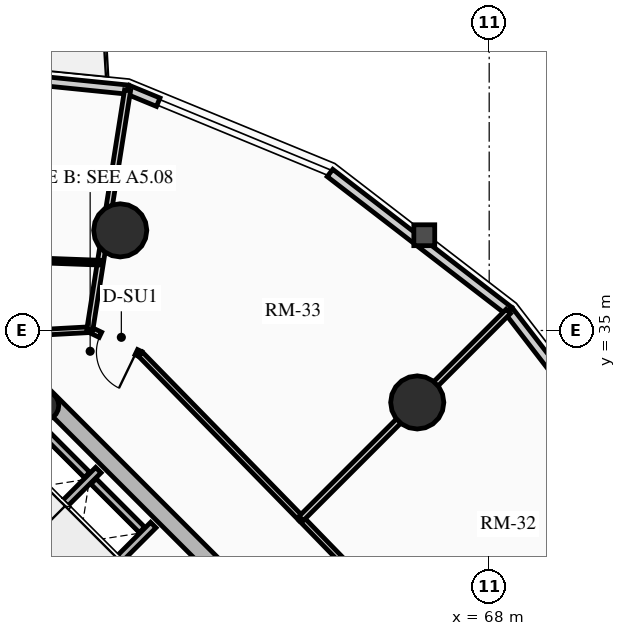
"""IFC4 building model, lengths in metres.
Left out: names, types, materials, properties, quantities, classifications, styles, units other than length and angle.
Written with IfcOpenShell. Run it as: python <this file> out.ifc"""

import sys

from ifc_helpers import new_model, si_unit, direction, frame, frame_2d, origin, origin_2d, place, context, subcontext, project, spatial, rectangle, circle, hollow_circle, extrude, source, transform, mapped, element, fill, save


model = new_model("IFC4")
c1 = context("Model", 3, precision=1e-05, world=origin(), true_north=direction((0.0, 1.0)))
c2 = subcontext(c1, "Body", "Model", "MODEL_VIEW")
j1 = project(units=[si_unit("LENGTHUNIT", "METRE"), si_unit("PLANEANGLEUNIT", "RADIAN")], contexts=[c1])
p1 = place(None, origin())
s1 = spatial("IfcSite", under=j1, at=p1, CompositionType="ELEMENT")
p2 = place(p1, origin())
s2 = spatial("IfcBuilding", under=s1, at=p2, CompositionType="ELEMENT")
p3 = place(p2, frame((0.0, 0.0, 87.61)))
s3 = spatial("IfcBuildingStorey", under=s2, at=p3, CompositionType="ELEMENT", Elevation=87.61)
p4 = place(p3, frame((66.303, 23.263, 0.0), z_axis=(0.0, 0.0, 1.0), x_axis=(-0.707106781187, 0.707106781187, 0.0)))
e1 = element("IfcWall", 1, at=p4, inside=s3, PredefinedType="SHEAR", context=c2, shape_type="SweptSolid", body=[
    extrude(rectangle(XDim=14.2, YDim=0.45, at=frame_2d((7.1, 0.0))), origin(), (0.0, 0.0, 1.0), 2.91),
])
p5 = place(p3, frame((48.856, 25.578, 0.0), z_axis=(0.0, 0.0, 1.0), x_axis=(0.707106781187, 0.707106781187, 0.0)))
e2 = element("IfcWall", 2, at=p5, inside=s3, PredefinedType="SHEAR", context=c2, shape_type="SweptSolid", body=[
    extrude(rectangle(XDim=10.7, YDim=0.45, at=frame_2d((5.35, 0.0))), origin(), (0.0, 0.0, 1.0), 2.91),
])
m1 = source(origin(), c2, "Body", "SweptSolid", [
    extrude(rectangle(XDim=1.5, YDim=2.02, at=frame_2d((0.75, 1.01))), frame((0.0, 0.235, 0.0), z_axis=(0.0, -1.0, 0.0), x_axis=(1.0, 0.0, 0.0)), (0.0, 0.0, 1.0), 0.47),
])
p6 = place(p5, frame((4.6, 0.0, 0.0)))
e3 = element("IfcOpeningElement", 3, at=p6, cuts=e2, PredefinedType="OPENING", context=c2, shape_type="MappedRepresentation", body=[
    mapped(m1, transform((0.0, 0.0, 0.0), x_axis=(1.0, 0.0, 0.0), y_axis=(0.0, 1.0, 0.0), z_axis=(0.0, 0.0, 1.0), scale=1.0)),
])
p7 = place(p3, frame((63.645, 20.922, 0.0), z_axis=(0.0, 0.0, 1.0), x_axis=(-0.707106781187, 0.707106781187, 0.0)))
e4 = element("IfcWall", 4, at=p7, inside=s3, PredefinedType="SHEAR", context=c2, shape_type="SweptSolid", body=[
    extrude(rectangle(XDim=13.75, YDim=0.35, at=frame_2d((6.875, 0.0))), origin(), (0.0, 0.0, 1.0), 2.91),
])
m2 = source(origin(), c2, "Body", "SweptSolid", [
    extrude(rectangle(XDim=1.1, YDim=2.015, at=frame_2d((0.55, 1.007))), frame((0.0, 0.185, 0.0), z_axis=(0.0, -1.0, 0.0), x_axis=(1.0, 0.0, 0.0)), (0.0, 0.0, 1.0), 0.37),
])
p8 = place(p7, frame((10.0, 0.0, 0.0)))
e5 = element("IfcOpeningElement", 5, at=p8, cuts=e4, PredefinedType="OPENING", context=c2, shape_type="MappedRepresentation", body=[
    mapped(m2, transform((0.0, 0.0, 0.0), x_axis=(1.0, 0.0, 0.0), y_axis=(0.0, 1.0, 0.0), z_axis=(0.0, 0.0, 1.0), scale=1.0)),
])
p9 = place(p7, frame((12.0, 0.0, 0.0)))
e6 = element("IfcOpeningElement", 6, at=p9, cuts=e4, PredefinedType="OPENING", context=c2, shape_type="MappedRepresentation", body=[
    mapped(m2, transform((0.0, 0.0, 0.0), x_axis=(1.0, 0.0, 0.0), y_axis=(0.0, 1.0, 0.0), z_axis=(0.0, 0.0, 1.0), scale=1.0)),
])
m3 = source(origin(), c2, "Body", "SweptSolid", [
    extrude(rectangle(XDim=1.15, YDim=2.02, at=frame_2d((0.575, 1.01))), frame((0.0, 0.185, 0.0), z_axis=(0.0, -1.0, 0.0), x_axis=(1.0, 0.0, 0.0)), (0.0, 0.0, 1.0), 0.37),
])
p10 = place(p7, frame((5.305, 0.0, 0.0)))
e7 = element("IfcOpeningElement", 7, at=p10, cuts=e4, PredefinedType="OPENING", context=c2, shape_type="MappedRepresentation", body=[
    mapped(m3, transform((0.0, 0.0, 0.0), x_axis=(1.0, 0.0, 0.0), y_axis=(0.0, 1.0, 0.0), z_axis=(0.0, 0.0, 1.0), scale=1.0)),
])
p11 = place(p3, frame((56.294, 33.024, 0.0), z_axis=(0.0, 0.0, 1.0), x_axis=(0.707106781187, 0.707106781187, 0.0)))
e8 = element("IfcColumn", 8, at=p11, inside=s3, PredefinedType="COLUMN", context=c2, shape_type="SweptSolid", body=[
    extrude(hollow_circle(Radius=0.38, WallThickness=0.032, at=origin_2d()), origin(), (0.0, 0.0, 1.0), 2.91),
])
for number, where, z_axis, x_axis in (
    (9, (66.107, 33.107, 0.0), (0.0, 0.0, 1.0), (1.0, 0.0, 0.0)),
    (10, (58.291, 37.635, 0.0), (0.0, 0.0, 1.0), (1.0, 0.0, 0.0)),
):
    element("IfcColumn", number, at=place(p3, frame(where, z_axis=z_axis, x_axis=x_axis)), inside=s3, PredefinedType="USERDEFINED", context=c2, shape_type="SweptSolid", body=[
        extrude(circle(Radius=0.7, at=origin_2d()), origin(), (0.0, 0.0, 1.0), 2.91),
    ])
p12 = place(p3, frame((63.811, 39.145, 0.0), z_axis=(0.0, 0.0, 1.0), x_axis=(0.791982052206, -0.61054437102, 0.0)))
e11 = element("IfcWall", 11, at=p12, inside=s3, PredefinedType="SOLIDWALL", context=c2, shape_type="SweptSolid", body=[
    extrude(rectangle(XDim=5.942, YDim=0.24, at=frame_2d((2.971, 0.0))), origin(), (0.0, 0.0, 1.0), 2.179),
])
p13 = place(p3, frame((58.487, 41.339, 0.0), z_axis=(0.0, 0.0, 1.0), x_axis=(0.924556017656, -0.381046152345, 0.0)))
e12 = element("IfcWall", 12, at=p13, inside=s3, PredefinedType="SOLIDWALL", context=c2, shape_type="SweptSolid", body=[
    extrude(rectangle(XDim=0.87, YDim=0.24, at=frame_2d((0.435, 0.0))), origin(), (0.0, 0.0, 1.0), 2.179),
])
p14 = place(p3, frame((53.067, 41.885, 0.0), z_axis=(0.0, 0.0, 1.0), x_axis=(0.994971754311, -0.10015591906, 0.0)))
e13 = element("IfcWall", 13, at=p14, inside=s3, PredefinedType="SOLIDWALL", context=c2, shape_type="SweptSolid", body=[
    extrude(rectangle(XDim=5.448, YDim=0.24, at=frame_2d((2.724, 0.0))), origin(), (0.0, 0.0, 1.0), 2.179),
])
m4 = source(origin(), c2, "Body", "SweptSolid", [
    extrude(rectangle(XDim=1.15, YDim=2.005, at=frame_2d((0.575, 1.002))), frame((0.0, 0.13, 0.0), z_axis=(0.0, -1.0, 0.0), x_axis=(1.0, 0.0, 0.0)), (0.0, 0.0, 1.0), 0.26),
])
p15 = place(p14, frame((2.149, 0.0, 0.0)))
e14 = element("IfcOpeningElement", 14, at=p15, cuts=e13, PredefinedType="OPENING", context=c2, shape_type="MappedRepresentation", body=[
    mapped(m4, transform((0.0, 0.0, 0.0), x_axis=(1.0, 0.0, 0.0), y_axis=(0.0, 1.0, 0.0), z_axis=(0.0, 0.0, 1.0), scale=1.0)),
])
p16 = place(p3, frame((68.517, 35.517, 0.0), z_axis=(0.0, 0.0, 1.0), x_axis=(0.61054437102, -0.791982052206, 0.0)))
e15 = element("IfcWall", 15, at=p16, inside=s3, PredefinedType="SOLIDWALL", context=c2, shape_type="SweptSolid", body=[
    extrude(rectangle(XDim=5.942, YDim=0.24, at=frame_2d((2.971, 0.0))), origin(), (0.0, 0.0, 1.0), 2.179),
])
m5 = source(origin(), c2, "Body", "SweptSolid", [
    extrude(rectangle(XDim=1.9, YDim=1.35, at=frame_2d((0.95, 0.675))), frame((0.0, 0.13, 0.0), z_axis=(0.0, -1.0, 0.0), x_axis=(1.0, 0.0, 0.0)), (0.0, 0.0, 1.0), 0.26),
])
p17 = place(p16, frame((2.021, 0.0, 0.65)))
e16 = element("IfcOpeningElement", 16, at=p17, cuts=e15, PredefinedType="OPENING", context=c2, shape_type="MappedRepresentation", body=[
    mapped(m5, transform((0.0, 0.0, 0.0), x_axis=(1.0, 0.0, 0.0), y_axis=(0.0, 1.0, 0.0), z_axis=(0.0, 0.0, 1.0), scale=1.0)),
])
p18 = place(p3, frame((57.062, 27.781, 0.0), z_axis=(0.0, 0.0, 1.0), x_axis=(0.707106781187, 0.707106781187, 0.0)))
e17 = element("IfcWall", 17, at=p18, inside=s3, PredefinedType="SHEAR", context=c2, shape_type="SweptSolid", body=[
    extrude(rectangle(XDim=2.97, YDim=0.2, at=frame_2d((1.485, 0.0))), origin(), (0.0, 0.0, 1.0), 2.91),
])
p19 = place(p3, frame((55.615, 29.227, 0.0), z_axis=(0.0, 0.0, 1.0), x_axis=(0.707147878904, 0.70706568108, 0.0)))
e18 = element("IfcWall", 18, at=p19, inside=s3, PredefinedType="SHEAR", context=c2, shape_type="SweptSolid", body=[
    extrude(rectangle(XDim=2.97, YDim=0.2, at=frame_2d((1.485, 0.0))), origin(), (0.0, 0.0, 1.0), 2.91),
])
p20 = place(p3, frame((58.865, 29.754, 0.0), z_axis=(0.0, 0.0, 1.0), x_axis=(-0.707174411312, 0.707039144592, 0.0)))
e19 = element("IfcWall", 19, at=p20, inside=s3, PredefinedType="SHEAR", context=c2, shape_type="SweptSolid", body=[
    extrude(rectangle(XDim=1.805, YDim=0.2, at=frame_2d((0.902, 0.0))), origin(), (0.0, 0.0, 1.0), 2.91),
])
p21 = place(p3, frame((57.419, 31.2, 0.0), z_axis=(0.0, 0.0, 1.0), x_axis=(-0.707032117043, 0.707181437447, 0.0)))
e20 = element("IfcWall", 20, at=p21, inside=s3, PredefinedType="SHEAR", context=c2, shape_type="SweptSolid", body=[
    extrude(rectangle(XDim=1.635, YDim=0.2, at=frame_2d((0.817, 0.0))), origin(), (0.0, 0.0, 1.0), 2.91),
])
p22 = place(p3, frame((63.051, 30.051, 0.0), z_axis=(0.0, 0.0, 1.0), x_axis=(-0.698846622234, 0.715271555839, 0.0)))
e21 = element("IfcWall", 21, at=p22, inside=s3, PredefinedType="PARTITIONING", context=c2, shape_type="SweptSolid", body=[
    extrude(rectangle(XDim=6.05, YDim=0.15, at=frame_2d((3.025, 0.0))), origin(), (0.0, 0.0, 1.0), 2.225),
])
p23 = place(p3, frame((58.823, 34.378, 0.0), z_axis=(0.0, 0.0, 1.0), x_axis=(-0.900449137666, 0.434961320668, 0.0)))
e22 = element("IfcWall", 22, at=p23, inside=s3, PredefinedType="PARTITIONING", context=c2, shape_type="SweptSolid", body=[
    extrude(rectangle(XDim=1.479, YDim=0.15, at=frame_2d((0.74, 0.0))), origin(), (0.0, 0.0, 1.0), 2.225),
])
m6 = source(origin(), c2, "Body", "SweptSolid", [
    extrude(rectangle(XDim=1.05, YDim=2.015, at=frame_2d((0.525, 1.007))), frame((0.0, 0.085, 0.0), z_axis=(0.0, -1.0, 0.0), x_axis=(1.0, 0.0, 0.0)), (0.0, 0.0, 1.0), 0.17),
])
p24 = place(p23, frame((0.12, 0.0, 0.0)))
e23 = element("IfcOpeningElement", 23, at=p24, cuts=e22, PredefinedType="OPENING", context=c2, shape_type="MappedRepresentation", body=[
    mapped(m6, transform((0.0, 0.0, 0.0), x_axis=(1.0, 0.0, 0.0), y_axis=(0.0, 1.0, 0.0), z_axis=(0.0, 0.0, 1.0), scale=1.0)),
])
p25 = place(p3, frame((57.491, 35.021, 0.0), z_axis=(0.0, 0.0, 1.0), x_axis=(-0.9985194771, -0.054395347698, 0.0)))
e24 = element("IfcWall", 24, at=p25, inside=s3, PredefinedType="PARTITIONING", context=c2, shape_type="SweptSolid", body=[
    extrude(rectangle(XDim=1.472, YDim=0.15, at=frame_2d((0.736, 0.0))), origin(), (0.0, 0.0, 1.0), 2.225),
])
p26 = place(p3, frame((67.19, 25.791, 0.0), z_axis=(0.0, 0.0, 1.0), x_axis=(-0.696839457851, 0.717227139742, 0.0)))
e25 = element("IfcWall", 25, at=p26, inside=s3, PredefinedType="PARTITIONING", context=c2, shape_type="SweptSolid", body=[
    extrude(rectangle(XDim=5.939, YDim=0.15, at=frame_2d((2.97, 0.0))), origin(), (0.0, 0.0, 1.0), 2.655),
])
p27 = place(p3, frame((63.051, 30.051, 0.0), z_axis=(0.0, 0.0, 1.0), x_axis=(0.707106781187, 0.707106781187, 0.0)))
e26 = element("IfcWall", 26, at=p27, inside=s3, PredefinedType="PARTITIONING", context=c2, shape_type="SweptSolid", body=[
    extrude(rectangle(XDim=7.711, YDim=0.16, at=frame_2d((3.855, 0.0))), origin(), (0.0, 0.0, 1.0), 2.179),
])
p28 = place(p3, frame((57.491, 35.021, 0.0), z_axis=(0.0, 0.0, 1.0), x_axis=(0.155805268746, 0.98778779008, 0.0)))
e27 = element("IfcWall", 27, at=p28, inside=s3, PredefinedType="PARTITIONING", context=c2, shape_type="SweptSolid", body=[
    extrude(rectangle(XDim=6.376, YDim=0.16, at=frame_2d((3.188, 0.0))), origin(), (0.0, 0.0, 1.0), 2.179),
])
p29 = place(p3, frame((57.769, 36.785, 0.0), z_axis=(0.0, 0.0, 1.0), x_axis=(-0.999316779648, 0.036959084311, 0.0)))
e28 = element("IfcWall", 28, at=p29, inside=s3, PredefinedType="PARTITIONING", context=c2, shape_type="SweptSolid", body=[
    extrude(rectangle(XDim=2.576, YDim=0.125, at=frame_2d((1.288, 0.0))), origin(), (0.0, 0.0, 1.0), 2.655),
])
m7 = source(origin(), c2, "Body", "SweptSolid", [
    extrude(rectangle(XDim=1.05, YDim=2.015, at=frame_2d((0.525, 1.007))), frame((0.0, 0.025, 0.0), z_axis=(0.0, -1.0, 0.0), x_axis=(1.0, 0.0, 0.0)), (0.0, 0.0, 1.0), 0.05),
])
p30 = place(p24, origin())
e29 = element("IfcDoor", 29, at=p30, inside=s3, OperationType="SINGLE_SWING_LEFT", PredefinedType="DOOR", context=c2, shape_type="MappedRepresentation", body=[
    mapped(m7, transform((0.0, 0.0, 0.0), x_axis=(1.0, 0.0, 0.0), y_axis=(0.0, 1.0, 0.0), z_axis=(0.0, 0.0, 1.0), scale=1.0)),
])
fill(e23, e29)
save(model, sys.argv[1])
